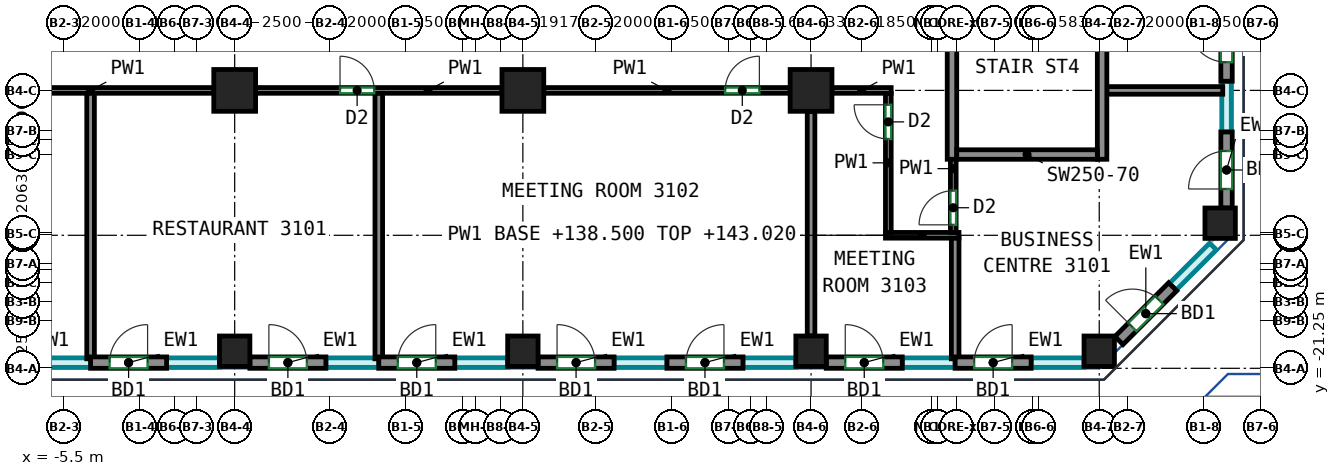
"""IFC4 building model, lengths in metres.
Left out: names, types, materials, properties, quantities, classifications, styles, units other than length and angle.
Written with IfcOpenShell. Run it as: python <this file> out.ifc"""

import sys

from ifc_helpers import new_model, si_unit, direction, frame, frame_2d, origin, origin_2d, place, context, subcontext, project, spatial, rectangle, extrude, source, transform, mapped, element, fill, save


model = new_model("IFC4")
c1 = context("Model", 3, precision=1e-05, world=origin(), true_north=direction((0.0, 1.0)))
c2 = subcontext(c1, "Body", "Model", "MODEL_VIEW")
j1 = project(units=[si_unit("LENGTHUNIT", "METRE"), si_unit("PLANEANGLEUNIT", "RADIAN")], contexts=[c1])
p1 = place(None, origin())
s1 = spatial("IfcSite", under=j1, at=p1, CompositionType="ELEMENT")
p2 = place(p1, origin())
s2 = spatial("IfcBuilding", under=s1, at=p2, CompositionType="ELEMENT")
p3 = place(p2, frame((0.0, 0.0, 138.5)))
s3 = spatial("IfcBuildingStorey", under=s2, at=p3, CompositionType="ELEMENT", Elevation=138.5)
m1 = source(origin(), c2, "Body", "SweptSolid", [
    extrude(rectangle(XDim=0.8, YDim=0.8, at=origin_2d()), origin(), (0.0, 0.0, 1.0), 5.12),
])
p4 = place(p3, frame((-1.0, -20.8, 0.0), z_axis=(0.0, 0.0, 1.0), x_axis=(1.0, 0.0, 0.0)))
e1 = element("IfcColumn", 1, at=p4, inside=s3, PredefinedType="COLUMN", context=c2, shape_type="MappedRepresentation", body=[
    mapped(m1, transform((0.0, 0.0, 0.0))),
])
m2 = source(origin(), c2, "Body", "SweptSolid", [
    extrude(rectangle(XDim=1.1, YDim=1.1, at=origin_2d()), origin(), (0.0, 0.0, 1.0), 5.12),
])
p5 = place(p3, frame((-1.0, -13.938, 0.0), z_axis=(0.0, 0.0, 1.0), x_axis=(1.0, 0.0, 0.0)))
e2 = element("IfcColumn", 2, at=p5, inside=s3, PredefinedType="COLUMN", context=c2, shape_type="MappedRepresentation", body=[
    mapped(m2, transform((0.0, 0.0, 0.0))),
])
p6 = place(p3, frame((6.583, -20.8, 0.0), z_axis=(0.0, 0.0, 1.0), x_axis=(1.0, 0.0, 0.0)))
e3 = element("IfcColumn", 3, at=p6, inside=s3, PredefinedType="COLUMN", context=c2, shape_type="MappedRepresentation", body=[
    mapped(m1, transform((0.0, 0.0, 0.0))),
])
p7 = place(p3, frame((6.583, -13.938, 0.0), z_axis=(0.0, 0.0, 1.0), x_axis=(1.0, 0.0, 0.0)))
e4 = element("IfcColumn", 4, at=p7, inside=s3, PredefinedType="COLUMN", context=c2, shape_type="MappedRepresentation", body=[
    mapped(m2, transform((0.0, 0.0, 0.0))),
])
p8 = place(p3, frame((14.167, -20.8, 0.0), z_axis=(0.0, 0.0, 1.0), x_axis=(1.0, 0.0, 0.0)))
e5 = element("IfcColumn", 5, at=p8, inside=s3, PredefinedType="COLUMN", context=c2, shape_type="MappedRepresentation", body=[
    mapped(m1, transform((0.0, 0.0, 0.0))),
])
p9 = place(p3, frame((14.167, -13.938, 0.0), z_axis=(0.0, 0.0, 1.0), x_axis=(1.0, 0.0, 0.0)))
e6 = element("IfcColumn", 6, at=p9, inside=s3, PredefinedType="COLUMN", context=c2, shape_type="MappedRepresentation", body=[
    mapped(m2, transform((0.0, 0.0, 0.0))),
])
for number, where, z_axis, x_axis in (
    (7, (21.75, -20.8, 0.0), (0.0, 0.0, 1.0), (1.0, 0.0, 0.0)),
    (8, (24.932, -17.432, 0.0), (0.0, 0.0, 1.0), (1.0, 0.0, 0.0)),
):
    element("IfcColumn", number, at=place(p3, frame(where, z_axis=z_axis, x_axis=x_axis)), inside=s3, PredefinedType="COLUMN", context=c2, shape_type="MappedRepresentation", body=[
        mapped(m1, transform((0.0, 0.0, 0.0))),
    ])
m3 = source(origin(), c2, "Body", "SweptSolid", [
    extrude(rectangle(XDim=8.0, YDim=0.25, at=frame_2d((4.0, 0.0))), origin(), (0.0, 0.0, 1.0), 5.12),
])
for number, where, z_axis, x_axis in (
    (9, (17.875, -15.75, 0.0), (0.0, 0.0, 1.0), (0.0, 1.0, 0.0)),
    (10, (21.825, -15.75, 0.0), (0.0, 0.0, 1.0), (0.0, 1.0, 0.0)),
):
    element("IfcWall", number, at=place(p3, frame(where, z_axis=z_axis, x_axis=x_axis)), inside=s3, PredefinedType="SHEAR", context=c2, shape_type="MappedRepresentation", body=[
        mapped(m3, transform((0.0, 0.0, 0.0))),
    ])
m4 = source(origin(), c2, "Body", "SweptSolid", [
    extrude(rectangle(XDim=3.7, YDim=0.25, at=frame_2d((1.85, 0.0))), origin(), (0.0, 0.0, 1.0), 5.12),
])
p10 = place(p3, frame((18.0, -15.625, 0.0), z_axis=(0.0, 0.0, 1.0), x_axis=(1.0, 0.0, 0.0)))
e11 = element("IfcWall", 11, at=p10, inside=s3, PredefinedType="SHEAR", context=c2, shape_type="MappedRepresentation", body=[
    mapped(m4, transform((0.0, 0.0, 0.0))),
])
m5 = source(origin(), c2, "Body", "SweptSolid", [
    extrude(rectangle(XDim=2.0, YDim=0.3, at=frame_2d((1.0, 0.0))), origin(), (0.0, 0.0, 1.0), 5.12),
])
p11 = place(p3, frame((-4.792, -21.1, 0.0), z_axis=(0.0, 0.0, 1.0), x_axis=(1.0, 0.0, 0.0)))
e12 = element("IfcWall", 12, at=p11, inside=s3, PredefinedType="SOLIDWALL", context=c2, shape_type="MappedRepresentation", body=[
    mapped(m5, transform((0.0, 0.0, 0.0))),
])
p12 = place(p11, frame((0.5, 0.0, 0.0)))
e13 = element("IfcOpeningElement", 13, at=p12, cuts=e12, PredefinedType="OPENING", context=c2, shape_type="SweptSolid", body=[
    extrude(rectangle(XDim=1.0, YDim=2.1, at=frame_2d((0.5, 1.05))), frame((0.0, 0.16, 0.0), z_axis=(0.0, -1.0, 0.0), x_axis=(1.0, 0.0, 0.0)), (0.0, 0.0, 1.0), 0.32),
])
p13 = place(p3, frame((-0.6, -21.1, 0.0), z_axis=(0.0, 0.0, 1.0), x_axis=(1.0, 0.0, 0.0)))
e14 = element("IfcWall", 14, at=p13, inside=s3, PredefinedType="SOLIDWALL", context=c2, shape_type="MappedRepresentation", body=[
    mapped(m5, transform((0.0, 0.0, 0.0))),
])
p14 = place(p13, frame((0.5, 0.0, 0.0)))
e15 = element("IfcOpeningElement", 15, at=p14, cuts=e14, PredefinedType="OPENING", context=c2, shape_type="SweptSolid", body=[
    extrude(rectangle(XDim=1.0, YDim=2.1, at=frame_2d((0.5, 1.05))), frame((0.0, 0.16, 0.0), z_axis=(0.0, -1.0, 0.0), x_axis=(1.0, 0.0, 0.0)), (0.0, 0.0, 1.0), 0.32),
])
p15 = place(p3, frame((2.792, -21.1, 0.0), z_axis=(0.0, 0.0, 1.0), x_axis=(1.0, 0.0, 0.0)))
e16 = element("IfcWall", 16, at=p15, inside=s3, PredefinedType="SOLIDWALL", context=c2, shape_type="MappedRepresentation", body=[
    mapped(m5, transform((0.0, 0.0, 0.0))),
])
p16 = place(p15, frame((0.5, 0.0, 0.0)))
e17 = element("IfcOpeningElement", 17, at=p16, cuts=e16, PredefinedType="OPENING", context=c2, shape_type="SweptSolid", body=[
    extrude(rectangle(XDim=1.0, YDim=2.1, at=frame_2d((0.5, 1.05))), frame((0.0, 0.16, 0.0), z_axis=(0.0, -1.0, 0.0), x_axis=(1.0, 0.0, 0.0)), (0.0, 0.0, 1.0), 0.32),
])
p17 = place(p3, frame((6.983, -21.1, 0.0), z_axis=(0.0, 0.0, 1.0), x_axis=(1.0, 0.0, 0.0)))
e18 = element("IfcWall", 18, at=p17, inside=s3, PredefinedType="SOLIDWALL", context=c2, shape_type="MappedRepresentation", body=[
    mapped(m5, transform((0.0, 0.0, 0.0))),
])
p18 = place(p17, frame((0.5, 0.0, 0.0)))
e19 = element("IfcOpeningElement", 19, at=p18, cuts=e18, PredefinedType="OPENING", context=c2, shape_type="SweptSolid", body=[
    extrude(rectangle(XDim=1.0, YDim=2.1, at=frame_2d((0.5, 1.05))), frame((0.0, 0.16, 0.0), z_axis=(0.0, -1.0, 0.0), x_axis=(1.0, 0.0, 0.0)), (0.0, 0.0, 1.0), 0.32),
])
p19 = place(p3, frame((10.375, -21.1, 0.0), z_axis=(0.0, 0.0, 1.0), x_axis=(1.0, 0.0, 0.0)))
e20 = element("IfcWall", 20, at=p19, inside=s3, PredefinedType="SOLIDWALL", context=c2, shape_type="MappedRepresentation", body=[
    mapped(m5, transform((0.0, 0.0, 0.0))),
])
p20 = place(p19, frame((0.5, 0.0, 0.0)))
e21 = element("IfcOpeningElement", 21, at=p20, cuts=e20, PredefinedType="OPENING", context=c2, shape_type="SweptSolid", body=[
    extrude(rectangle(XDim=1.0, YDim=2.1, at=frame_2d((0.5, 1.05))), frame((0.0, 0.16, 0.0), z_axis=(0.0, -1.0, 0.0), x_axis=(1.0, 0.0, 0.0)), (0.0, 0.0, 1.0), 0.32),
])
p21 = place(p3, frame((14.567, -21.1, 0.0), z_axis=(0.0, 0.0, 1.0), x_axis=(1.0, 0.0, 0.0)))
e22 = element("IfcWall", 22, at=p21, inside=s3, PredefinedType="SOLIDWALL", context=c2, shape_type="MappedRepresentation", body=[
    mapped(m5, transform((0.0, 0.0, 0.0))),
])
p22 = place(p21, frame((0.5, 0.0, 0.0)))
e23 = element("IfcOpeningElement", 23, at=p22, cuts=e22, PredefinedType="OPENING", context=c2, shape_type="SweptSolid", body=[
    extrude(rectangle(XDim=1.0, YDim=2.1, at=frame_2d((0.5, 1.05))), frame((0.0, 0.16, 0.0), z_axis=(0.0, -1.0, 0.0), x_axis=(1.0, 0.0, 0.0)), (0.0, 0.0, 1.0), 0.32),
])
p23 = place(p3, frame((17.958, -21.1, 0.0), z_axis=(0.0, 0.0, 1.0), x_axis=(1.0, 0.0, 0.0)))
e24 = element("IfcWall", 24, at=p23, inside=s3, PredefinedType="SOLIDWALL", context=c2, shape_type="MappedRepresentation", body=[
    mapped(m5, transform((0.0, 0.0, 0.0))),
])
p24 = place(p23, frame((0.5, 0.0, 0.0)))
e25 = element("IfcOpeningElement", 25, at=p24, cuts=e24, PredefinedType="OPENING", context=c2, shape_type="SweptSolid", body=[
    extrude(rectangle(XDim=1.0, YDim=2.1, at=frame_2d((0.5, 1.05))), frame((0.0, 0.16, 0.0), z_axis=(0.0, -1.0, 0.0), x_axis=(1.0, 0.0, 0.0)), (0.0, 0.0, 1.0), 0.32),
])
p25 = place(p3, frame((22.269, -20.519, 0.0), z_axis=(0.0, 0.0, 1.0), x_axis=(0.70716781496, 0.707045742145, 0.0)))
e26 = element("IfcWall", 26, at=p25, inside=s3, PredefinedType="SOLIDWALL", context=c2, shape_type="MappedRepresentation", body=[
    mapped(m5, transform((0.0, 0.0, 0.0))),
])
p26 = place(p25, frame((0.5, 0.0, 0.0)))
e27 = element("IfcOpeningElement", 27, at=p26, cuts=e26, PredefinedType="OPENING", context=c2, shape_type="SweptSolid", body=[
    extrude(rectangle(XDim=1.0, YDim=2.1, at=frame_2d((0.5, 1.05))), frame((0.0, 0.16, 0.0), z_axis=(0.0, -1.0, 0.0), x_axis=(1.0, 0.0, 0.0)), (0.0, 0.0, 1.0), 0.32),
])
p27 = place(p3, frame((25.1, -17.032, 0.0), z_axis=(0.0, 0.0, 1.0), x_axis=(0.0, 1.0, 0.0)))
e28 = element("IfcWall", 28, at=p27, inside=s3, PredefinedType="SOLIDWALL", context=c2, shape_type="MappedRepresentation", body=[
    mapped(m5, transform((0.0, 0.0, 0.0))),
])
p28 = place(p27, frame((0.5, 0.0, 0.0)))
e29 = element("IfcOpeningElement", 29, at=p28, cuts=e28, PredefinedType="OPENING", context=c2, shape_type="SweptSolid", body=[
    extrude(rectangle(XDim=1.0, YDim=2.1, at=frame_2d((0.5, 1.05))), frame((0.0, 0.16, 0.0), z_axis=(0.0, -1.0, 0.0), x_axis=(1.0, 0.0, 0.0)), (0.0, 0.0, 1.0), 0.32),
])
p29 = place(p3, frame((25.1, -13.696, 0.0), z_axis=(0.0, 0.0, 1.0), x_axis=(0.0, 1.0, 0.0)))
e30 = element("IfcWall", 30, at=p29, inside=s3, PredefinedType="SOLIDWALL", context=c2, shape_type="MappedRepresentation", body=[
    mapped(m5, transform((0.0, 0.0, 0.0))),
])
p30 = place(p29, frame((0.5, 0.0, 0.0)))
e31 = element("IfcOpeningElement", 31, at=p30, cuts=e30, PredefinedType="OPENING", context=c2, shape_type="SweptSolid", body=[
    extrude(rectangle(XDim=1.0, YDim=2.1, at=frame_2d((0.5, 1.05))), frame((0.0, 0.16, 0.0), z_axis=(0.0, -1.0, 0.0), x_axis=(1.0, 0.0, 0.0)), (0.0, 0.0, 1.0), 0.32),
])
p31 = place(p3, frame((-8.033, -13.938, 0.0), z_axis=(0.0, 0.0, 1.0), x_axis=(1.0, 0.0, 0.0)))
e32 = element("IfcWall", 32, at=p31, inside=s3, PredefinedType="PARTITIONING", context=c2, shape_type="SweptSolid", body=[
    extrude(rectangle(XDim=6.483, YDim=0.15, at=frame_2d((3.241, 0.0))), origin(), (0.0, 0.0, 1.0), 5.12),
])
p32 = place(p3, frame((-0.45, -13.938, 0.0), z_axis=(0.0, 0.0, 1.0), x_axis=(1.0, 0.0, 0.0)))
e33 = element("IfcWall", 33, at=p32, inside=s3, PredefinedType="PARTITIONING", context=c2, shape_type="SweptSolid", body=[
    extrude(rectangle(XDim=6.483, YDim=0.15, at=frame_2d((3.241, 0.0))), origin(), (0.0, 0.0, 1.0), 5.12),
])
p33 = place(p32, frame((2.222, 0.0, 0.0)))
e34 = element("IfcOpeningElement", 34, at=p33, cuts=e33, PredefinedType="OPENING", context=c2, shape_type="SweptSolid", body=[
    extrude(rectangle(XDim=0.9, YDim=2.1, at=frame_2d((0.45, 1.05))), frame((0.0, 0.085, 0.0), z_axis=(0.0, -1.0, 0.0), x_axis=(1.0, 0.0, 0.0)), (0.0, 0.0, 1.0), 0.17),
])
p34 = place(p3, frame((7.133, -13.938, 0.0), z_axis=(0.0, 0.0, 1.0), x_axis=(1.0, 0.0, 0.0)))
e35 = element("IfcWall", 35, at=p34, inside=s3, PredefinedType="PARTITIONING", context=c2, shape_type="SweptSolid", body=[
    extrude(rectangle(XDim=6.484, YDim=0.15, at=frame_2d((3.242, 0.0))), origin(), (0.0, 0.0, 1.0), 5.12),
])
p35 = place(p34, frame((4.774, 0.0, 0.0)))
e36 = element("IfcOpeningElement", 36, at=p35, cuts=e35, PredefinedType="OPENING", context=c2, shape_type="SweptSolid", body=[
    extrude(rectangle(XDim=0.9, YDim=2.1, at=frame_2d((0.45, 1.05))), frame((0.0, 0.085, 0.0), z_axis=(0.0, -1.0, 0.0), x_axis=(1.0, 0.0, 0.0)), (0.0, 0.0, 1.0), 0.17),
])
p36 = place(p3, frame((16.125, -17.75, 0.0), z_axis=(0.0, 0.0, 1.0), x_axis=(1.0, 0.0, 0.0)))
e37 = element("IfcWall", 37, at=p36, inside=s3, PredefinedType="PARTITIONING", context=c2, shape_type="SweptSolid", body=[
    extrude(rectangle(XDim=1.934, YDim=0.15, at=frame_2d((0.967, 0.0))), origin(), (0.0, 0.0, 1.0), 4.52),
])
p37 = place(p3, frame((16.2, -17.675, 0.0), z_axis=(0.0, 0.0, 1.0), x_axis=(0.0, 1.0, 0.0)))
e38 = element("IfcWall", 38, at=p37, inside=s3, PredefinedType="PARTITIONING", context=c2, shape_type="SweptSolid", body=[
    extrude(rectangle(XDim=3.662, YDim=0.15, at=frame_2d((1.831, 0.0))), origin(), (0.0, 0.0, 1.0), 5.12),
])
p38 = place(p37, frame((2.459, 0.0, 0.0)))
e39 = element("IfcOpeningElement", 39, at=p38, cuts=e38, PredefinedType="OPENING", context=c2, shape_type="SweptSolid", body=[
    extrude(rectangle(XDim=0.9, YDim=2.1, at=frame_2d((0.45, 1.05))), frame((0.0, 0.085, 0.0), z_axis=(0.0, -1.0, 0.0), x_axis=(1.0, 0.0, 0.0)), (0.0, 0.0, 1.0), 0.17),
])
p39 = place(p3, frame((14.717, -13.938, 0.0), z_axis=(0.0, 0.0, 1.0), x_axis=(1.0, 0.0, 0.0)))
e40 = element("IfcWall", 40, at=p39, inside=s3, PredefinedType="PARTITIONING", context=c2, shape_type="SweptSolid", body=[
    extrude(rectangle(XDim=1.558, YDim=0.15, at=frame_2d((0.779, 0.0))), origin(), (0.0, 0.0, 1.0), 5.12),
])
p40 = place(p3, frame((17.909, -17.675, 0.0), z_axis=(0.0, 0.0, 1.0), x_axis=(0.0, 1.0, 0.0)))
e41 = element("IfcWall", 41, at=p40, inside=s3, PredefinedType="PARTITIONING", context=c2, shape_type="SweptSolid", body=[
    extrude(rectangle(XDim=1.975, YDim=0.15, at=frame_2d((0.988, 0.0))), origin(), (0.0, 0.0, 1.0), 5.12),
])
p41 = place(p40, frame((0.2, 0.0, 0.0)))
e42 = element("IfcOpeningElement", 42, at=p41, cuts=e41, PredefinedType="OPENING", context=c2, shape_type="SweptSolid", body=[
    extrude(rectangle(XDim=0.9, YDim=2.1, at=frame_2d((0.45, 1.05))), frame((0.0, 0.085, 0.0), z_axis=(0.0, -1.0, 0.0), x_axis=(1.0, 0.0, 0.0)), (0.0, 0.0, 1.0), 0.17),
])
for number, where, z_axis, x_axis in (
    (43, (-4.792, -21.0, 0.0), (0.0, 0.0, 1.0), (0.0, 1.0, 0.0)),
    (44, (2.792, -21.0, 0.0), (0.0, 0.0, 1.0), (0.0, 1.0, 0.0)),
):
    element("IfcWall", number, at=place(p3, frame(where, z_axis=z_axis, x_axis=x_axis)), inside=s3, PredefinedType="PARTITIONING", context=c2, shape_type="SweptSolid", body=[
        extrude(rectangle(XDim=6.985, YDim=0.2, at=frame_2d((3.493, 0.0))), origin(), (0.0, 0.0, 1.0), 5.12),
    ])
p42 = place(p3, frame((14.167, -20.4, 0.0), z_axis=(0.0, 0.0, 1.0), x_axis=(0.0, 1.0, 0.0)))
e45 = element("IfcWall", 45, at=p42, inside=s3, PredefinedType="PARTITIONING", context=c2, shape_type="SweptSolid", body=[
    extrude(rectangle(XDim=5.912, YDim=0.2, at=frame_2d((2.956, 0.0))), origin(), (0.0, 0.0, 1.0), 5.12),
])
p43 = place(p3, frame((17.959, -21.0, 0.0), z_axis=(0.0, 0.0, 1.0), x_axis=(0.0, 1.0, 0.0)))
e46 = element("IfcWall", 46, at=p43, inside=s3, PredefinedType="PARTITIONING", context=c2, shape_type="SweptSolid", body=[
    extrude(rectangle(XDim=3.173, YDim=0.2, at=frame_2d((1.586, 0.0))), origin(), (0.0, 0.0, 1.0), 5.12),
])
p44 = place(p3, frame((25.0, -13.938, 0.0), z_axis=(0.0, 0.0, 1.0), x_axis=(-1.0, 0.0, 0.0)))
e47 = element("IfcWall", 47, at=p44, inside=s3, PredefinedType="PARTITIONING", context=c2, shape_type="SweptSolid", body=[
    extrude(rectangle(XDim=3.05, YDim=0.2, at=frame_2d((1.525, 0.0))), origin(), (0.0, 0.0, 1.0), 5.12),
])
p45 = place(p12, origin())
e48 = element("IfcDoor", 48, at=p45, inside=s3, OperationType="SINGLE_SWING_RIGHT", PredefinedType="DOOR", context=c2, shape_type="SweptSolid", body=[
    extrude(rectangle(XDim=1.0, YDim=2.1, at=frame_2d((0.5, 1.05))), frame((0.0, 0.025, 0.0), z_axis=(0.0, -1.0, 0.0), x_axis=(1.0, 0.0, 0.0)), (0.0, 0.0, 1.0), 0.05),
])
fill(e13, e48)
p46 = place(p14, origin())
e49 = element("IfcDoor", 49, at=p46, inside=s3, OperationType="SINGLE_SWING_LEFT", PredefinedType="DOOR", context=c2, shape_type="SweptSolid", body=[
    extrude(rectangle(XDim=1.0, YDim=2.1, at=frame_2d((0.5, 1.05))), frame((0.0, 0.025, 0.0), z_axis=(0.0, -1.0, 0.0), x_axis=(1.0, 0.0, 0.0)), (0.0, 0.0, 1.0), 0.05),
])
fill(e15, e49)
p47 = place(p16, origin())
e50 = element("IfcDoor", 50, at=p47, inside=s3, OperationType="SINGLE_SWING_RIGHT", PredefinedType="DOOR", context=c2, shape_type="SweptSolid", body=[
    extrude(rectangle(XDim=1.0, YDim=2.1, at=frame_2d((0.5, 1.05))), frame((0.0, 0.025, 0.0), z_axis=(0.0, -1.0, 0.0), x_axis=(1.0, 0.0, 0.0)), (0.0, 0.0, 1.0), 0.05),
])
fill(e17, e50)
p48 = place(p18, origin())
e51 = element("IfcDoor", 51, at=p48, inside=s3, OperationType="SINGLE_SWING_LEFT", PredefinedType="DOOR", context=c2, shape_type="SweptSolid", body=[
    extrude(rectangle(XDim=1.0, YDim=2.1, at=frame_2d((0.5, 1.05))), frame((0.0, 0.025, 0.0), z_axis=(0.0, -1.0, 0.0), x_axis=(1.0, 0.0, 0.0)), (0.0, 0.0, 1.0), 0.05),
])
fill(e19, e51)
p49 = place(p20, origin())
e52 = element("IfcDoor", 52, at=p49, inside=s3, OperationType="SINGLE_SWING_RIGHT", PredefinedType="DOOR", context=c2, shape_type="SweptSolid", body=[
    extrude(rectangle(XDim=1.0, YDim=2.1, at=frame_2d((0.5, 1.05))), frame((0.0, 0.025, 0.0), z_axis=(0.0, -1.0, 0.0), x_axis=(1.0, 0.0, 0.0)), (0.0, 0.0, 1.0), 0.05),
])
fill(e21, e52)
p50 = place(p22, origin())
e53 = element("IfcDoor", 53, at=p50, inside=s3, OperationType="SINGLE_SWING_LEFT", PredefinedType="DOOR", context=c2, shape_type="SweptSolid", body=[
    extrude(rectangle(XDim=1.0, YDim=2.1, at=frame_2d((0.5, 1.05))), frame((0.0, 0.025, 0.0), z_axis=(0.0, -1.0, 0.0), x_axis=(1.0, 0.0, 0.0)), (0.0, 0.0, 1.0), 0.05),
])
fill(e23, e53)
p51 = place(p24, origin())
e54 = element("IfcDoor", 54, at=p51, inside=s3, OperationType="SINGLE_SWING_RIGHT", PredefinedType="DOOR", context=c2, shape_type="SweptSolid", body=[
    extrude(rectangle(XDim=1.0, YDim=2.1, at=frame_2d((0.5, 1.05))), frame((0.0, 0.025, 0.0), z_axis=(0.0, -1.0, 0.0), x_axis=(1.0, 0.0, 0.0)), (0.0, 0.0, 1.0), 0.05),
])
fill(e25, e54)
p52 = place(p26, origin())
e55 = element("IfcDoor", 55, at=p52, inside=s3, OperationType="SINGLE_SWING_LEFT", PredefinedType="DOOR", context=c2, shape_type="SweptSolid", body=[
    extrude(rectangle(XDim=1.0, YDim=2.1, at=frame_2d((0.5, 1.05))), frame((0.0, 0.025, 0.0), z_axis=(0.0, -1.0, 0.0), x_axis=(1.0, 0.0, 0.0)), (0.0, 0.0, 1.0), 0.05),
])
fill(e27, e55)
p53 = place(p28, origin())
e56 = element("IfcDoor", 56, at=p53, inside=s3, OperationType="SINGLE_SWING_LEFT", PredefinedType="DOOR", context=c2, shape_type="SweptSolid", body=[
    extrude(rectangle(XDim=1.0, YDim=2.1, at=frame_2d((0.5, 1.05))), frame((0.0, 0.025, 0.0), z_axis=(0.0, -1.0, 0.0), x_axis=(1.0, 0.0, 0.0)), (0.0, 0.0, 1.0), 0.05),
])
fill(e29, e56)
p54 = place(p30, origin())
e57 = element("IfcDoor", 57, at=p54, inside=s3, OperationType="SINGLE_SWING_RIGHT", PredefinedType="DOOR", context=c2, shape_type="SweptSolid", body=[
    extrude(rectangle(XDim=1.0, YDim=2.1, at=frame_2d((0.5, 1.05))), frame((0.0, 0.025, 0.0), z_axis=(0.0, -1.0, 0.0), x_axis=(1.0, 0.0, 0.0)), (0.0, 0.0, 1.0), 0.05),
])
fill(e31, e57)
p55 = place(p41, origin())
e58 = element("IfcDoor", 58, at=p55, inside=s3, OperationType="SINGLE_SWING_LEFT", PredefinedType="DOOR", context=c2, shape_type="SweptSolid", body=[
    extrude(rectangle(XDim=0.9, YDim=2.1, at=frame_2d((0.45, 1.05))), frame((0.0, 0.025, 0.0), z_axis=(0.0, -1.0, 0.0), x_axis=(1.0, 0.0, 0.0)), (0.0, 0.0, 1.0), 0.05),
])
fill(e42, e58)
p56 = place(p38, origin())
e59 = element("IfcDoor", 59, at=p56, inside=s3, OperationType="SINGLE_SWING_RIGHT", PredefinedType="DOOR", context=c2, shape_type="SweptSolid", body=[
    extrude(rectangle(XDim=0.9, YDim=2.1, at=frame_2d((0.45, 1.05))), frame((0.0, 0.025, 0.0), z_axis=(0.0, -1.0, 0.0), x_axis=(1.0, 0.0, 0.0)), (0.0, 0.0, 1.0), 0.05),
])
fill(e39, e59)
p57 = place(p33, origin())
e60 = element("IfcDoor", 60, at=p57, inside=s3, OperationType="SINGLE_SWING_LEFT", PredefinedType="DOOR", context=c2, shape_type="SweptSolid", body=[
    extrude(rectangle(XDim=0.9, YDim=2.1, at=frame_2d((0.45, 1.05))), frame((0.0, 0.025, 0.0), z_axis=(0.0, -1.0, 0.0), x_axis=(1.0, 0.0, 0.0)), (0.0, 0.0, 1.0), 0.05),
])
fill(e34, e60)
p58 = place(p35, origin())
e61 = element("IfcDoor", 61, at=p58, inside=s3, OperationType="SINGLE_SWING_RIGHT", PredefinedType="DOOR", context=c2, shape_type="SweptSolid", body=[
    extrude(rectangle(XDim=0.9, YDim=2.1, at=frame_2d((0.45, 1.05))), frame((0.0, 0.025, 0.0), z_axis=(0.0, -1.0, 0.0), x_axis=(1.0, 0.0, 0.0)), (0.0, 0.0, 1.0), 0.05),
])
fill(e36, e61)
save(model, sys.argv[1])
